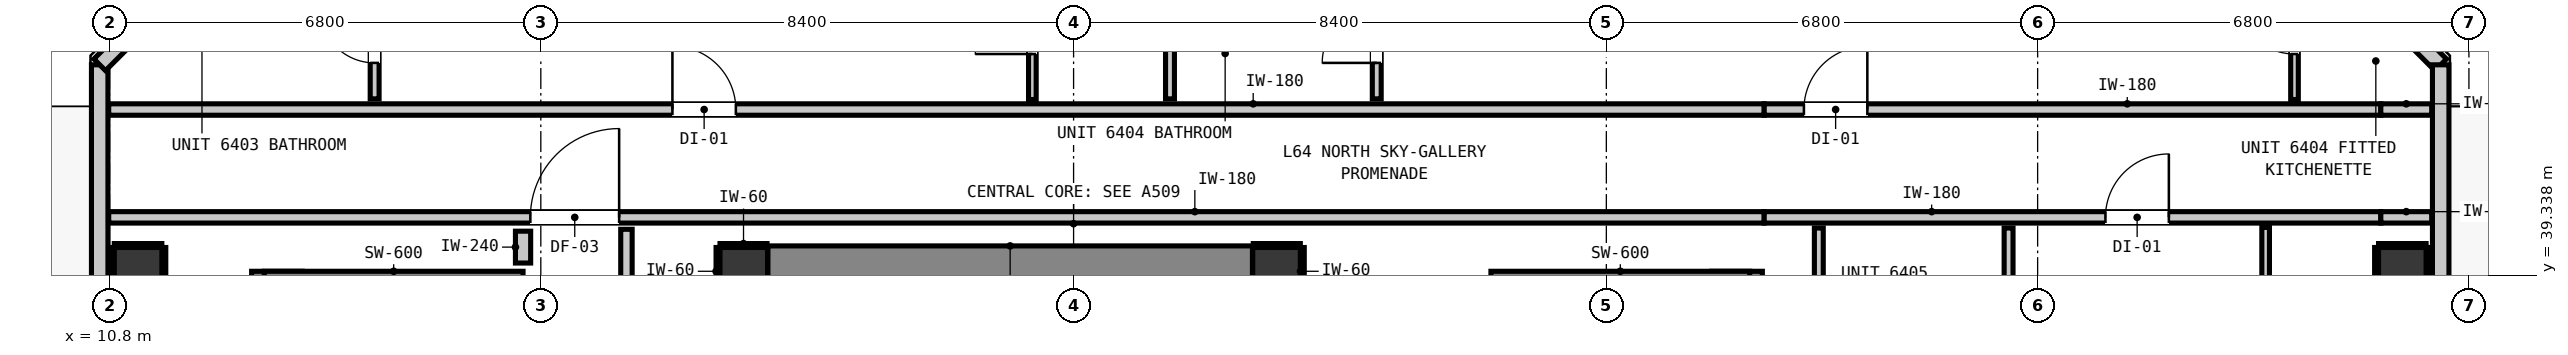
"""IFC4 building model, lengths in metres.
Left out: names, types, materials, properties, quantities, classifications, styles, units other than length and angle.
Written with IfcOpenShell. Run it as: python <this file> out.ifc"""

import sys

from ifc_helpers import new_model, si_unit, direction, frame, frame_2d, origin, origin_2d, place, context, subcontext, project, spatial, rectangle, extrude, element, fill, save


model = new_model("IFC4")
c1 = context("Model", 3, precision=1e-05, world=origin(), true_north=direction((0.0, 1.0)))
c2 = subcontext(c1, "Body", "Model", "MODEL_VIEW")
j1 = project(units=[si_unit("LENGTHUNIT", "METRE"), si_unit("PLANEANGLEUNIT", "RADIAN")], contexts=[c1])
p1 = place(None, origin())
s1 = spatial("IfcSite", under=j1, at=p1, CompositionType="ELEMENT")
p2 = place(p1, origin())
s2 = spatial("IfcBuilding", under=s1, at=p2, CompositionType="ELEMENT")
p3 = place(p2, frame((0.0, 0.0, 220.04)))
s3 = spatial("IfcBuildingStorey", under=s2, at=p3, CompositionType="ELEMENT", Elevation=220.04)
for number, where, z_axis, x_axis in (
    (1, (20.8, 39.4, 0.0), (0.0, 0.0, 1.0), (1.0, 0.0, 0.0)),
    (2, (29.2, 39.4, 0.0), (0.0, 0.0, 1.0), (1.0, 0.0, 0.0)),
):
    element("IfcColumn", number, at=place(p3, frame(where, z_axis=z_axis, x_axis=x_axis)), inside=s3, PredefinedType="COLUMN", context=c2, shape_type="SweptSolid", body=[
        extrude(rectangle(XDim=0.75, YDim=0.75, at=origin_2d()), origin(), (0.0, 0.0, 1.0), 3.32),
    ])
p4 = place(p3, frame((13.44, 31.08, 0.0), z_axis=(0.0, 0.0, 1.0), x_axis=(0.0, 1.0, 0.0)))
e3 = element("IfcWall", 3, at=p4, inside=s3, PredefinedType="SHEAR", context=c2, shape_type="SweptSolid", body=[
    extrude(rectangle(XDim=8.32, YDim=0.8, at=frame_2d((4.16, 0.0))), origin(), (0.0, 0.0, 1.0), 3.32),
])
p5 = place(p3, frame((13.24, 39.1, 0.0), z_axis=(0.0, 0.0, 1.0), x_axis=(1.0, 0.0, 0.0)))
e4 = element("IfcWall", 4, at=p5, inside=s3, PredefinedType="SHEAR", context=c2, shape_type="SweptSolid", body=[
    extrude(rectangle(XDim=4.08, YDim=0.6, at=frame_2d((2.04, 0.0))), origin(), (0.0, 0.0, 1.0), 3.32),
])
p6 = place(p3, frame((36.46, 31.08, 0.0), z_axis=(0.0, 0.0, 1.0), x_axis=(0.0, 1.0, 0.0)))
e5 = element("IfcWall", 5, at=p6, inside=s3, PredefinedType="SHEAR", context=c2, shape_type="SweptSolid", body=[
    extrude(rectangle(XDim=8.32, YDim=0.8, at=frame_2d((4.16, 0.0))), origin(), (0.0, 0.0, 1.0), 3.32),
])
p7 = place(p3, frame((32.58, 39.1, 0.0), z_axis=(0.0, 0.0, 1.0), x_axis=(1.0, 0.0, 0.0)))
e6 = element("IfcWall", 6, at=p7, inside=s3, PredefinedType="SHEAR", context=c2, shape_type="SweptSolid", body=[
    extrude(rectangle(XDim=4.08, YDim=0.6, at=frame_2d((2.04, 0.0))), origin(), (0.0, 0.0, 1.0), 3.32),
])
p8 = place(p3, frame((21.18, 39.4, 0.0), z_axis=(0.0, 0.0, 1.0), x_axis=(1.0, 0.0, 0.0)))
e7 = element("IfcWall", 7, at=p8, inside=s3, PredefinedType="SHEAR", context=c2, shape_type="SweptSolid", body=[
    extrude(rectangle(XDim=7.64, YDim=0.8, at=frame_2d((3.82, 0.0))), origin(), (0.0, 0.0, 1.0), 3.32),
])
for number, where, z_axis, x_axis in (
    (8, (11.25, 39.4, 0.0), (0.0, 0.0, 1.0), (1.0, 0.0, 0.0)),
    (9, (46.95, 39.4, 0.0), (0.0, 0.0, 1.0), (1.0, 0.0, 0.0)),
):
    element("IfcColumn", number, at=place(p3, frame(where, z_axis=z_axis, x_axis=x_axis)), inside=s3, PredefinedType="COLUMN", context=c2, shape_type="SweptSolid", body=[
        extrude(rectangle(XDim=0.75, YDim=0.75, at=origin_2d()), origin(), (0.0, 0.0, 1.0), 3.32),
    ])
p9 = place(p3, frame((10.645, 12.345, 0.0), z_axis=(0.0, 0.0, 1.0), x_axis=(0.0, 1.0, 0.0)))
e10 = element("IfcWall", 10, at=p9, inside=s3, PredefinedType="STANDARD", context=c2, shape_type="SweptSolid", body=[
    extrude(rectangle(XDim=30.31, YDim=0.26, at=frame_2d((15.155, 0.0))), origin(), (0.0, 0.0, 1.0), 3.1),
])
p10 = place(p9, frame((0.91, 0.0, 0.0)))
e11 = element("IfcOpeningElement", 11, at=p10, cuts=e10, PredefinedType="OPENING", context=c2, shape_type="SweptSolid", body=[
    extrude(rectangle(XDim=1.0, YDim=2.15, at=frame_2d((0.5, 1.075))), frame((0.0, 0.14, 0.0), z_axis=(0.0, -1.0, 0.0), x_axis=(1.0, 0.0, 0.0)), (0.0, 0.0, 1.0), 0.28),
])
p11 = place(p9, frame((2.322, 0.0, 0.85)))
e12 = element("IfcOpeningElement", 12, at=p11, cuts=e10, PredefinedType="OPENING", context=c2, shape_type="SweptSolid", body=[
    extrude(rectangle(XDim=0.58, YDim=1.5, at=frame_2d((0.29, 0.75))), frame((0.0, 0.14, 0.0), z_axis=(0.0, -1.0, 0.0), x_axis=(1.0, 0.0, 0.0)), (0.0, 0.0, 1.0), 0.28),
])
for number, where, z_axis, x_axis in (
    (13, (10.645, 42.655, 0.0), (0.0, 0.0, 1.0), (0.707, 0.707, 0.0)),
    (14, (45.455, 44.755, 0.0), (0.0, 0.0, 1.0), (0.707, -0.707, 0.0)),
):
    element("IfcWall", number, at=place(p3, frame(where, z_axis=z_axis, x_axis=x_axis)), inside=s3, PredefinedType="STANDARD", context=c2, shape_type="SweptSolid", body=[
        extrude(rectangle(XDim=2.97, YDim=0.26, at=frame_2d((1.485, 0.0))), origin(), (0.0, 0.0, 1.0), 3.1),
    ])
p12 = place(p3, frame((47.555, 42.655, 0.0), z_axis=(0.0, 0.0, 1.0), x_axis=(0.0, -1.0, 0.0)))
e15 = element("IfcWall", 15, at=p12, inside=s3, PredefinedType="STANDARD", context=c2, shape_type="SweptSolid", body=[
    extrude(rectangle(XDim=30.31, YDim=0.26, at=frame_2d((15.155, 0.0))), origin(), (0.0, 0.0, 1.0), 3.1),
])
p13 = place(p12, frame((4.082, 0.0, 0.0)))
e16 = element("IfcOpeningElement", 16, at=p13, cuts=e15, PredefinedType="OPENING", context=c2, shape_type="SweptSolid", body=[
    extrude(rectangle(XDim=1.0, YDim=2.15, at=frame_2d((0.5, 1.075))), frame((0.0, 0.14, 0.0), z_axis=(0.0, -1.0, 0.0), x_axis=(1.0, 0.0, 0.0)), (0.0, 0.0, 1.0), 0.28),
])
p14 = place(p12, frame((24.701, 0.0, 0.85)))
e17 = element("IfcOpeningElement", 17, at=p14, cuts=e15, PredefinedType="OPENING", context=c2, shape_type="SweptSolid", body=[
    extrude(rectangle(XDim=0.9, YDim=1.5, at=frame_2d((0.45, 0.75))), frame((0.0, 0.14, 0.0), z_axis=(0.0, -1.0, 0.0), x_axis=(1.0, 0.0, 0.0)), (0.0, 0.0, 1.0), 0.28),
])
p15 = place(p12, frame((28.258, 0.0, 0.85)))
e18 = element("IfcOpeningElement", 18, at=p15, cuts=e15, PredefinedType="OPENING", context=c2, shape_type="SweptSolid", body=[
    extrude(rectangle(XDim=0.9, YDim=1.5, at=frame_2d((0.45, 0.75))), frame((0.0, 0.14, 0.0), z_axis=(0.0, -1.0, 0.0), x_axis=(1.0, 0.0, 0.0)), (0.0, 0.0, 1.0), 0.28),
])
p16 = place(p12, frame((15.855, 0.0, 0.85)))
e19 = element("IfcOpeningElement", 19, at=p16, cuts=e15, PredefinedType="OPENING", context=c2, shape_type="SweptSolid", body=[
    extrude(rectangle(XDim=0.9, YDim=1.5, at=frame_2d((0.45, 0.75))), frame((0.0, 0.14, 0.0), z_axis=(0.0, -1.0, 0.0), x_axis=(1.0, 0.0, 0.0)), (0.0, 0.0, 1.0), 0.28),
])
p17 = place(p3, frame((10.787, 40.25, 0.0), z_axis=(0.0, 0.0, 1.0), x_axis=(1.0, 0.0, 0.0)))
e20 = element("IfcWall", 20, at=p17, inside=s3, PredefinedType="PARTITIONING", context=c2, shape_type="SweptSolid", body=[
    extrude(rectangle(XDim=26.102, YDim=0.18, at=frame_2d((13.051, 0.0))), origin(), (0.0, 0.0, 1.0), 3.1),
])
p18 = place(p17, frame((6.648, 0.0, 0.0)))
e21 = element("IfcOpeningElement", 21, at=p18, cuts=e20, PredefinedType="OPENING", context=c2, shape_type="SweptSolid", body=[
    extrude(rectangle(XDim=1.4, YDim=2.15, at=frame_2d((0.7, 1.075))), frame((0.0, 0.1, 0.0), z_axis=(0.0, -1.0, 0.0), x_axis=(1.0, 0.0, 0.0)), (0.0, 0.0, 1.0), 0.2),
])
p19 = place(p3, frame((36.889, 40.25, 0.0), z_axis=(0.0, 0.0, 1.0), x_axis=(1.0, 0.0, 0.0)))
e22 = element("IfcWall", 22, at=p19, inside=s3, PredefinedType="PARTITIONING", context=c2, shape_type="SweptSolid", body=[
    extrude(rectangle(XDim=9.722, YDim=0.18, at=frame_2d((4.861, 0.0))), origin(), (0.0, 0.0, 1.0), 2.477),
])
p20 = place(p19, frame((5.38, 0.0, 0.0)))
e23 = element("IfcOpeningElement", 23, at=p20, cuts=e22, PredefinedType="OPENING", context=c2, shape_type="SweptSolid", body=[
    extrude(rectangle(XDim=1.0, YDim=2.15, at=frame_2d((0.5, 1.075))), frame((0.0, 0.1, 0.0), z_axis=(0.0, -1.0, 0.0), x_axis=(1.0, 0.0, 0.0)), (0.0, 0.0, 1.0), 0.2),
])
p21 = place(p3, frame((46.611, 40.25, 0.0), z_axis=(0.0, 0.0, 1.0), x_axis=(1.0, 0.0, 0.0)))
e24 = element("IfcWall", 24, at=p21, inside=s3, PredefinedType="PARTITIONING", context=c2, shape_type="SweptSolid", body=[
    extrude(rectangle(XDim=0.802, YDim=0.18, at=frame_2d((0.401, 0.0))), origin(), (0.0, 0.0, 1.0), 3.1),
])
p22 = place(p3, frame((10.787, 41.95, 0.0), z_axis=(0.0, 0.0, 1.0), x_axis=(1.0, 0.0, 0.0)))
e25 = element("IfcWall", 25, at=p22, inside=s3, PredefinedType="PARTITIONING", context=c2, shape_type="SweptSolid", body=[
    extrude(rectangle(XDim=26.102, YDim=0.18, at=frame_2d((13.051, 0.0))), origin(), (0.0, 0.0, 1.0), 3.1),
])
p23 = place(p22, frame((8.888, 0.0, 0.0)))
e26 = element("IfcOpeningElement", 26, at=p23, cuts=e25, PredefinedType="OPENING", context=c2, shape_type="SweptSolid", body=[
    extrude(rectangle(XDim=1.0, YDim=2.15, at=frame_2d((0.5, 1.075))), frame((0.0, 0.1, 0.0), z_axis=(0.0, -1.0, 0.0), x_axis=(1.0, 0.0, 0.0)), (0.0, 0.0, 1.0), 0.2),
])
p24 = place(p3, frame((36.889, 41.95, 0.0), z_axis=(0.0, 0.0, 1.0), x_axis=(1.0, 0.0, 0.0)))
e27 = element("IfcWall", 27, at=p24, inside=s3, PredefinedType="PARTITIONING", context=c2, shape_type="SweptSolid", body=[
    extrude(rectangle(XDim=9.722, YDim=0.18, at=frame_2d((4.861, 0.0))), origin(), (0.0, 0.0, 1.0), 2.477),
])
p25 = place(p24, frame((0.626, 0.0, 0.0)))
e28 = element("IfcOpeningElement", 28, at=p25, cuts=e27, PredefinedType="OPENING", context=c2, shape_type="SweptSolid", body=[
    extrude(rectangle(XDim=1.0, YDim=2.15, at=frame_2d((0.5, 1.075))), frame((0.0, 0.1, 0.0), z_axis=(0.0, -1.0, 0.0), x_axis=(1.0, 0.0, 0.0)), (0.0, 0.0, 1.0), 0.2),
])
p26 = place(p3, frame((46.611, 41.95, 0.0), z_axis=(0.0, 0.0, 1.0), x_axis=(1.0, 0.0, 0.0)))
e29 = element("IfcWall", 29, at=p26, inside=s3, PredefinedType="PARTITIONING", context=c2, shape_type="SweptSolid", body=[
    extrude(rectangle(XDim=0.802, YDim=0.18, at=frame_2d((0.401, 0.0))), origin(), (0.0, 0.0, 1.0), 3.1),
])
p27 = place(p3, frame((17.32, 39.53, 0.0), z_axis=(0.0, 0.0, 1.0), x_axis=(0.0, 1.0, 0.0)))
e30 = element("IfcWall", 30, at=p27, inside=s3, PredefinedType="PARTITIONING", context=c2, shape_type="SweptSolid", body=[
    extrude(rectangle(XDim=0.502, YDim=0.24, at=frame_2d((0.251, 0.0))), origin(), (0.0, 0.0, 1.0), 3.1),
])
p28 = place(p3, frame((18.95, 39.058, 0.0), z_axis=(0.0, 0.0, 1.0), x_axis=(0.0, 1.0, 0.0)))
e31 = element("IfcWall", 31, at=p28, inside=s3, PredefinedType="PARTITIONING", context=c2, shape_type="SweptSolid", body=[
    extrude(rectangle(XDim=1.004, YDim=0.18, at=frame_2d((0.502, 0.0))), origin(), (0.0, 0.0, 1.0), 3.1),
])
p29 = place(p3, frame((14.98, 42.118, 0.0), z_axis=(0.0, 0.0, 1.0), x_axis=(0.0, 1.0, 0.0)))
e32 = element("IfcWall", 32, at=p29, inside=s3, PredefinedType="PARTITIONING", context=c2, shape_type="SweptSolid", body=[
    extrude(rectangle(XDim=2.495, YDim=0.14, at=frame_2d((1.248, 0.0))), origin(), (0.0, 0.0, 1.0), 3.1),
])
p30 = place(p29, frame((0.567, 0.0, 0.0)))
e33 = element("IfcOpeningElement", 33, at=p30, cuts=e32, PredefinedType="OPENING", context=c2, shape_type="SweptSolid", body=[
    extrude(rectangle(XDim=0.86, YDim=2.02, at=frame_2d((0.43, 1.01))), frame((0.0, 0.08, 0.0), z_axis=(0.0, -1.0, 0.0), x_axis=(1.0, 0.0, 0.0)), (0.0, 0.0, 1.0), 0.16),
])
p31 = place(p3, frame((27.52, 42.118, 0.0), z_axis=(0.0, 0.0, 1.0), x_axis=(0.0, 1.0, 0.0)))
e34 = element("IfcWall", 34, at=p31, inside=s3, PredefinedType="PARTITIONING", context=c2, shape_type="SweptSolid", body=[
    extrude(rectangle(XDim=2.495, YDim=0.14, at=frame_2d((1.248, 0.0))), origin(), (0.0, 0.0, 1.0), 3.1),
])
p32 = place(p3, frame((30.78, 42.118, 0.0), z_axis=(0.0, 0.0, 1.0), x_axis=(0.0, 1.0, 0.0)))
e35 = element("IfcWall", 35, at=p32, inside=s3, PredefinedType="PARTITIONING", context=c2, shape_type="SweptSolid", body=[
    extrude(rectangle(XDim=2.495, YDim=0.14, at=frame_2d((1.248, 0.0))), origin(), (0.0, 0.0, 1.0), 3.1),
])
p33 = place(p32, frame((0.567, 0.0, 0.0)))
e36 = element("IfcOpeningElement", 36, at=p33, cuts=e35, PredefinedType="OPENING", context=c2, shape_type="SweptSolid", body=[
    extrude(rectangle(XDim=0.86, YDim=2.02, at=frame_2d((0.43, 1.01))), frame((0.0, 0.08, 0.0), z_axis=(0.0, -1.0, 0.0), x_axis=(1.0, 0.0, 0.0)), (0.0, 0.0, 1.0), 0.16),
])
p34 = place(p3, frame((37.75, 36.679, 0.0), z_axis=(0.0, 0.0, 1.0), x_axis=(0.0, 1.0, 0.0)))
e37 = element("IfcWall", 37, at=p34, inside=s3, PredefinedType="PARTITIONING", context=c2, shape_type="SweptSolid", body=[
    extrude(rectangle(XDim=3.403, YDim=0.14, at=frame_2d((1.702, 0.0))), origin(), (0.0, 0.0, 1.0), 3.1),
])
p35 = place(p3, frame((40.742, 36.679, 0.0), z_axis=(0.0, 0.0, 1.0), x_axis=(0.0, 1.0, 0.0)))
e38 = element("IfcWall", 38, at=p35, inside=s3, PredefinedType="PARTITIONING", context=c2, shape_type="SweptSolid", body=[
    extrude(rectangle(XDim=3.403, YDim=0.14, at=frame_2d((1.702, 0.0))), origin(), (0.0, 0.0, 1.0), 3.1),
])
p36 = place(p35, frame((1.269, 0.0, 0.0)))
e39 = element("IfcOpeningElement", 39, at=p36, cuts=e38, PredefinedType="OPENING", context=c2, shape_type="SweptSolid", body=[
    extrude(rectangle(XDim=0.86, YDim=2.02, at=frame_2d((0.43, 1.01))), frame((0.0, 0.08, 0.0), z_axis=(0.0, -1.0, 0.0), x_axis=(1.0, 0.0, 0.0)), (0.0, 0.0, 1.0), 0.16),
])
p37 = place(p3, frame((25.35, 42.108, 0.0), z_axis=(0.0, 0.0, 1.0), x_axis=(0.0, 1.0, 0.0)))
e40 = element("IfcWall", 40, at=p37, inside=s3, PredefinedType="PARTITIONING", context=c2, shape_type="SweptSolid", body=[
    extrude(rectangle(XDim=2.505, YDim=0.12, at=frame_2d((1.252, 0.0))), origin(), (0.0, 0.0, 1.0), 3.1),
])
p38 = place(p37, frame((0.717, 0.0, 0.0)))
e41 = element("IfcOpeningElement", 41, at=p38, cuts=e40, PredefinedType="OPENING", context=c2, shape_type="SweptSolid", body=[
    extrude(rectangle(XDim=0.9, YDim=2.1, at=frame_2d((0.45, 1.05))), frame((0.0, 0.07, 0.0), z_axis=(0.0, -1.0, 0.0), x_axis=(1.0, 0.0, 0.0)), (0.0, 0.0, 1.0), 0.14),
])
p39 = place(p3, frame((44.795, 31.808, 0.0), z_axis=(0.0, 0.0, 1.0), x_axis=(0.0, 1.0, 0.0)))
e42 = element("IfcWall", 42, at=p39, inside=s3, PredefinedType="PARTITIONING", context=c2, shape_type="SweptSolid", body=[
    extrude(rectangle(XDim=8.284, YDim=0.12, at=frame_2d((4.142, 0.0))), origin(), (0.0, 0.0, 1.0), 3.1),
])
p40 = place(p39, frame((3.667, 0.0, 0.0)))
e43 = element("IfcOpeningElement", 43, at=p40, cuts=e42, PredefinedType="OPENING", context=c2, shape_type="SweptSolid", body=[
    extrude(rectangle(XDim=0.9, YDim=2.1, at=frame_2d((0.45, 1.05))), frame((0.0, 0.07, 0.0), z_axis=(0.0, -1.0, 0.0), x_axis=(1.0, 0.0, 0.0)), (0.0, 0.0, 1.0), 0.14),
])
p41 = place(p3, frame((45.25, 42.108, 0.0), z_axis=(0.0, 0.0, 1.0), x_axis=(0.0, 1.0, 0.0)))
e44 = element("IfcWall", 44, at=p41, inside=s3, PredefinedType="PARTITIONING", context=c2, shape_type="SweptSolid", body=[
    extrude(rectangle(XDim=2.505, YDim=0.12, at=frame_2d((1.252, 0.0))), origin(), (0.0, 0.0, 1.0), 3.1),
])
p42 = place(p41, frame((0.717, 0.0, 0.0)))
e45 = element("IfcOpeningElement", 45, at=p42, cuts=e44, PredefinedType="OPENING", context=c2, shape_type="SweptSolid", body=[
    extrude(rectangle(XDim=0.9, YDim=2.1, at=frame_2d((0.45, 1.05))), frame((0.0, 0.07, 0.0), z_axis=(0.0, -1.0, 0.0), x_axis=(1.0, 0.0, 0.0)), (0.0, 0.0, 1.0), 0.14),
])
p43 = place(p3, frame((20.425, 39.807, 0.0), z_axis=(0.0, 0.0, 1.0), x_axis=(1.0, 0.0, 0.0)))
e46 = element("IfcWall", 46, at=p43, inside=s3, PredefinedType="PARTITIONING", context=c2, shape_type="SweptSolid", body=[
    extrude(rectangle(XDim=0.742, YDim=0.06, at=frame_2d((0.371, 0.0))), origin(), (0.0, 0.0, 1.0), 1.45),
])
p44 = place(p3, frame((20.393, 39.025, 0.0), z_axis=(0.0, 0.0, 1.0), x_axis=(0.0, 1.0, 0.0)))
e47 = element("IfcWall", 47, at=p44, inside=s3, PredefinedType="PARTITIONING", context=c2, shape_type="SweptSolid", body=[
    extrude(rectangle(XDim=0.75, YDim=0.06, at=frame_2d((0.375, 0.0))), origin(), (0.0, 0.0, 1.0), 1.45),
])
p45 = place(p3, frame((28.833, 39.807, 0.0), z_axis=(0.0, 0.0, 1.0), x_axis=(1.0, 0.0, 0.0)))
e48 = element("IfcWall", 48, at=p45, inside=s3, PredefinedType="PARTITIONING", context=c2, shape_type="SweptSolid", body=[
    extrude(rectangle(XDim=0.742, YDim=0.06, at=frame_2d((0.371, 0.0))), origin(), (0.0, 0.0, 1.0), 1.45),
])
for number, where, z_axis, x_axis in (
    (49, (29.607, 39.025, 0.0), (0.0, 0.0, 1.0), (0.0, 1.0, 0.0)),
    (50, (10.875, 39.807, 0.0), (0.0, 0.0, 1.0), (1.0, 0.0, 0.0)),
    (51, (10.843, 39.025, 0.0), (0.0, 0.0, 1.0), (0.0, 1.0, 0.0)),
    (52, (11.657, 39.025, 0.0), (0.0, 0.0, 1.0), (0.0, 1.0, 0.0)),
    (53, (46.575, 39.807, 0.0), (0.0, 0.0, 1.0), (1.0, 0.0, 0.0)),
    (54, (46.543, 39.025, 0.0), (0.0, 0.0, 1.0), (0.0, 1.0, 0.0)),
    (55, (47.357, 39.025, 0.0), (0.0, 0.0, 1.0), (0.0, 1.0, 0.0)),
):
    element("IfcWall", number, at=place(p3, frame(where, z_axis=z_axis, x_axis=x_axis)), inside=s3, PredefinedType="PARTITIONING", context=c2, shape_type="SweptSolid", body=[
        extrude(rectangle(XDim=0.75, YDim=0.06, at=frame_2d((0.375, 0.0))), origin(), (0.0, 0.0, 1.0), 1.45),
    ])
p46 = place(p18, origin())
e56 = element("IfcDoor", 56, at=p46, inside=s3, OperationType="SINGLE_SWING_RIGHT", PredefinedType="DOOR", context=c2, shape_type="SweptSolid", body=[
    extrude(rectangle(XDim=1.4, YDim=2.15, at=frame_2d((0.7, 1.075))), frame((0.0, 0.025, 0.0), z_axis=(0.0, -1.0, 0.0), x_axis=(1.0, 0.0, 0.0)), (0.0, 0.0, 1.0), 0.05),
])
fill(e21, e56)
p47 = place(p23, origin())
e57 = element("IfcDoor", 57, at=p47, inside=s3, OperationType="SINGLE_SWING_LEFT", PredefinedType="DOOR", context=c2, shape_type="SweptSolid", body=[
    extrude(rectangle(XDim=1.0, YDim=2.15, at=frame_2d((0.5, 1.075))), frame((0.0, 0.025, 0.0), z_axis=(0.0, -1.0, 0.0), x_axis=(1.0, 0.0, 0.0)), (0.0, 0.0, 1.0), 0.05),
])
fill(e26, e57)
p48 = place(p30, origin())
e58 = element("IfcDoor", 58, at=p48, inside=s3, OperationType="SINGLE_SWING_RIGHT", PredefinedType="DOOR", context=c2, shape_type="SweptSolid", body=[
    extrude(rectangle(XDim=0.86, YDim=2.02, at=frame_2d((0.43, 1.01))), frame((0.0, 0.025, 0.0), z_axis=(0.0, -1.0, 0.0), x_axis=(1.0, 0.0, 0.0)), (0.0, 0.0, 1.0), 0.05),
])
fill(e33, e58)
p49 = place(p38, origin())
e59 = element("IfcDoor", 59, at=p49, inside=s3, OperationType="SINGLE_SWING_LEFT", PredefinedType="DOOR", context=c2, shape_type="SweptSolid", body=[
    extrude(rectangle(XDim=0.9, YDim=2.1, at=frame_2d((0.45, 1.05))), frame((0.0, 0.025, 0.0), z_axis=(0.0, -1.0, 0.0), x_axis=(1.0, 0.0, 0.0)), (0.0, 0.0, 1.0), 0.05),
])
fill(e41, e59)
p50 = place(p25, origin())
e60 = element("IfcDoor", 60, at=p50, inside=s3, OperationType="SINGLE_SWING_RIGHT", PredefinedType="DOOR", context=c2, shape_type="SweptSolid", body=[
    extrude(rectangle(XDim=1.0, YDim=2.15, at=frame_2d((0.5, 1.075))), frame((0.0, 0.025, 0.0), z_axis=(0.0, -1.0, 0.0), x_axis=(1.0, 0.0, 0.0)), (0.0, 0.0, 1.0), 0.05),
])
fill(e28, e60)
p51 = place(p33, origin())
e61 = element("IfcDoor", 61, at=p51, inside=s3, OperationType="SINGLE_SWING_LEFT", PredefinedType="DOOR", context=c2, shape_type="SweptSolid", body=[
    extrude(rectangle(XDim=0.86, YDim=2.02, at=frame_2d((0.43, 1.01))), frame((0.0, 0.025, 0.0), z_axis=(0.0, -1.0, 0.0), x_axis=(1.0, 0.0, 0.0)), (0.0, 0.0, 1.0), 0.05),
])
fill(e36, e61)
p52 = place(p42, origin())
e62 = element("IfcDoor", 62, at=p52, inside=s3, OperationType="SINGLE_SWING_RIGHT", PredefinedType="DOOR", context=c2, shape_type="SweptSolid", body=[
    extrude(rectangle(XDim=0.9, YDim=2.1, at=frame_2d((0.45, 1.05))), frame((0.0, 0.025, 0.0), z_axis=(0.0, -1.0, 0.0), x_axis=(1.0, 0.0, 0.0)), (0.0, 0.0, 1.0), 0.05),
])
fill(e45, e62)
p53 = place(p20, origin())
e63 = element("IfcDoor", 63, at=p53, inside=s3, OperationType="SINGLE_SWING_RIGHT", PredefinedType="DOOR", context=c2, shape_type="SweptSolid", body=[
    extrude(rectangle(XDim=1.0, YDim=2.15, at=frame_2d((0.5, 1.075))), frame((0.0, 0.025, 0.0), z_axis=(0.0, -1.0, 0.0), x_axis=(1.0, 0.0, 0.0)), (0.0, 0.0, 1.0), 0.05),
])
fill(e23, e63)
save(model, sys.argv[1])
